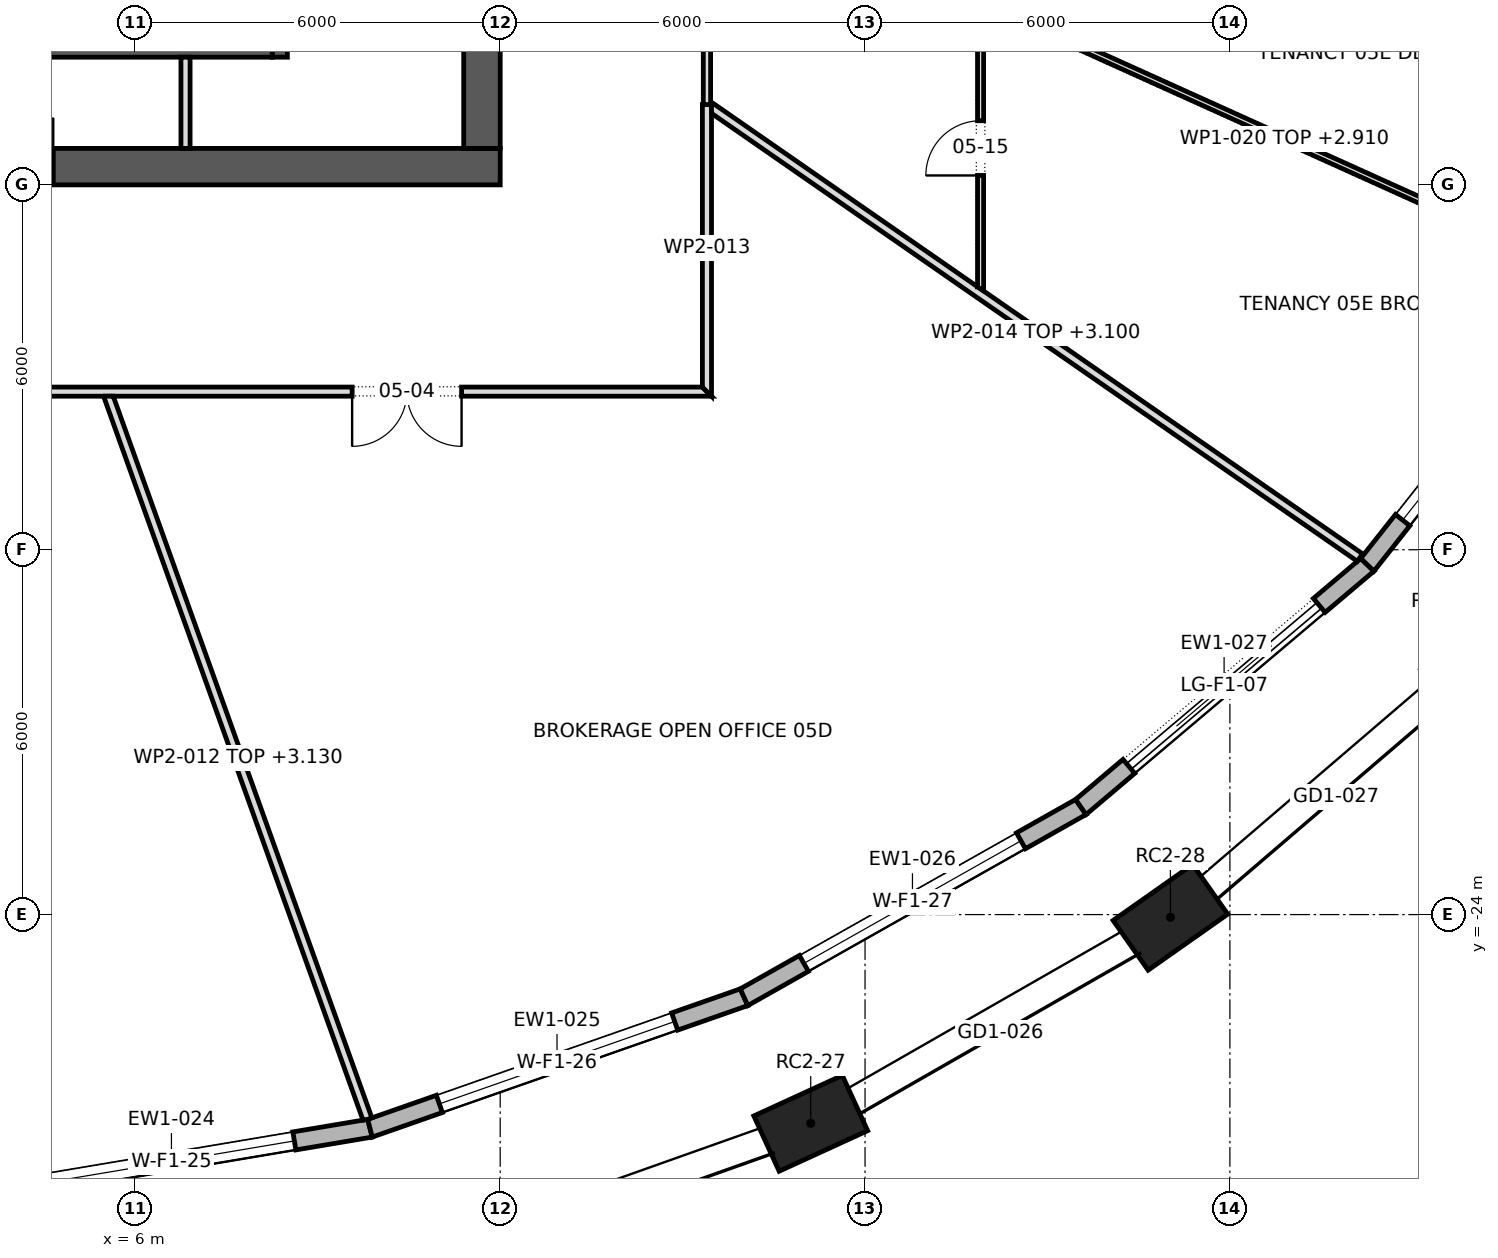
"""IFC4 building model, lengths in metres.
Left out: names, types, materials, properties, quantities, classifications, styles, units other than length and angle.
Written with IfcOpenShell. Run it as: python <this file> out.ifc"""

import sys

from ifc_helpers import new_model, si_unit, direction, frame, frame_2d, origin, origin_2d, place, context, subcontext, project, spatial, polyline, rectangle, outline, extrude, element, fill, save


model = new_model("IFC4")
c1 = context("Model", 3, precision=1e-05, world=origin(), true_north=direction((0.0, 1.0)))
c2 = subcontext(c1, "Body", "Model", "MODEL_VIEW")
j1 = project(units=[si_unit("LENGTHUNIT", "METRE"), si_unit("PLANEANGLEUNIT", "RADIAN")], contexts=[c1])
p1 = place(None, origin())
s1 = spatial("IfcSite", under=j1, at=p1, CompositionType="ELEMENT")
p2 = place(p1, origin())
s2 = spatial("IfcBuilding", under=s1, at=p2, CompositionType="ELEMENT")
p3 = place(p2, frame((0.0, 0.0, 82.3)))
s3 = spatial("IfcBuildingStorey", under=s2, at=p3, CompositionType="ELEMENT", Elevation=82.3)
for number, where, z_axis, x_axis in (
    (1, (17.107, -27.432, 0.0), (0.0, 0.0, 1.0), (0.909, 0.417, 0.0)),
    (2, (23.022, -24.045, 0.0), (0.0, 0.0, 1.0), (0.818, 0.575, 0.0)),
):
    element("IfcColumn", number, at=place(p3, frame(where, z_axis=z_axis, x_axis=x_axis)), inside=s3, PredefinedType="COLUMN", context=c2, shape_type="SweptSolid", body=[
        extrude(rectangle(XDim=1.6, YDim=1.0, at=origin_2d()), origin(), (0.0, 0.0, 1.0), 4.2),
    ])
p4 = place(p3, frame((-12.0, -11.7, 0.0), z_axis=(0.0, 0.0, 1.0), x_axis=(1.0, 0.0, 0.0)))
e3 = element("IfcWall", 3, at=p4, inside=s3, PredefinedType="SHEAR", context=c2, shape_type="SweptSolid", body=[
    extrude(rectangle(XDim=24.0, YDim=0.6, at=frame_2d((12.0, 0.0))), origin(), (0.0, 0.0, 1.0), 4.2),
])
p5 = place(p4, frame((9.975, 0.0, 0.0)))
e4 = element("IfcOpeningElement", 4, at=p5, cuts=e3, PredefinedType="OPENING", context=c2, shape_type="SweptSolid", body=[
    extrude(rectangle(XDim=0.9, YDim=2.1, at=frame_2d((0.45, 1.05))), frame((0.0, 0.312, 0.0), z_axis=(0.0, -1.0, 0.0), x_axis=(1.0, 0.0, 0.0)), (0.0, 0.0, 1.0), 0.624),
])
p6 = place(p4, frame((4.6, 0.0, 0.0)))
e5 = element("IfcOpeningElement", 5, at=p6, cuts=e3, PredefinedType="OPENING", context=c2, shape_type="SweptSolid", body=[
    extrude(rectangle(XDim=0.8, YDim=2.1, at=frame_2d((0.4, 1.05))), frame((0.0, 0.312, 0.0), z_axis=(0.0, -1.0, 0.0), x_axis=(1.0, 0.0, 0.0)), (0.0, 0.0, 1.0), 0.624),
])
p7 = place(p4, frame((7.0, 0.0, 0.0)))
e6 = element("IfcOpeningElement", 6, at=p7, cuts=e3, PredefinedType="OPENING", context=c2, shape_type="SweptSolid", body=[
    extrude(rectangle(XDim=0.8, YDim=2.1, at=frame_2d((0.4, 1.05))), frame((0.0, 0.312, 0.0), z_axis=(0.0, -1.0, 0.0), x_axis=(1.0, 0.0, 0.0)), (0.0, 0.0, 1.0), 0.624),
])
p8 = place(p4, frame((15.85, 0.0, 0.0)))
e7 = element("IfcOpeningElement", 7, at=p8, cuts=e3, PredefinedType="OPENING", context=c2, shape_type="SweptSolid", body=[
    extrude(rectangle(XDim=0.8, YDim=2.1, at=frame_2d((0.4, 1.05))), frame((0.0, 0.312, 0.0), z_axis=(0.0, -1.0, 0.0), x_axis=(1.0, 0.0, 0.0)), (0.0, 0.0, 1.0), 0.624),
])
p9 = place(p3, frame((11.7, -11.4, 0.0), z_axis=(0.0, 0.0, 1.0), x_axis=(0.0, 1.0, 0.0)))
e8 = element("IfcWall", 8, at=p9, inside=s3, PredefinedType="SHEAR", context=c2, shape_type="SweptSolid", body=[
    extrude(rectangle(XDim=22.8, YDim=0.6, at=frame_2d((11.4, 0.0))), origin(), (0.0, 0.0, 1.0), 4.2),
])
p10 = place(p9, frame((10.2, 0.0, 0.0)))
e9 = element("IfcOpeningElement", 9, at=p10, cuts=e8, PredefinedType="OPENING", context=c2, shape_type="SweptSolid", body=[
    extrude(rectangle(XDim=2.4, YDim=2.1, at=frame_2d((1.2, 1.05))), frame((0.0, 0.312, 0.0), z_axis=(0.0, -1.0, 0.0), x_axis=(1.0, 0.0, 0.0)), (0.0, 0.0, 1.0), 0.624),
])
p11 = place(p9, frame((19.5, 0.0, 0.0)))
e10 = element("IfcOpeningElement", 10, at=p11, cuts=e8, PredefinedType="OPENING", context=c2, shape_type="SweptSolid", body=[
    extrude(rectangle(XDim=1.2, YDim=2.1, at=frame_2d((0.6, 1.05))), frame((0.0, 0.312, 0.0), z_axis=(0.0, -1.0, 0.0), x_axis=(1.0, 0.0, 0.0)), (0.0, 0.0, 1.0), 0.624),
])
p12 = place(p9, frame((2.1, 0.0, 0.0)))
e11 = element("IfcOpeningElement", 11, at=p12, cuts=e8, PredefinedType="OPENING", context=c2, shape_type="SweptSolid", body=[
    extrude(rectangle(XDim=1.2, YDim=2.1, at=frame_2d((0.6, 1.05))), frame((0.0, 0.312, 0.0), z_axis=(0.0, -1.0, 0.0), x_axis=(1.0, 0.0, 0.0)), (0.0, 0.0, 1.0), 0.624),
])
p13 = place(p3, frame((3.329, -28.611, 0.0), z_axis=(0.0, 0.0, 1.0), x_axis=(0.986157735925, 0.165809890767, 0.0)))
e12 = element("IfcWall", 12, at=p13, inside=s3, PredefinedType="STANDARD", context=c2, shape_type="SweptSolid", body=[
    extrude(outline(polyline([(-0.012, -0.15), (6.634, -0.15), (6.609, 0.15), (0.012, 0.15), (-0.012, -0.15)])), origin(), (0.0, 0.0, 1.0), 3.9),
])
p14 = place(p13, frame((1.261, 0.0, 0.6)))
e13 = element("IfcOpeningElement", 13, at=p14, cuts=e12, PredefinedType="OPENING", context=c2, shape_type="SweptSolid", body=[
    extrude(rectangle(XDim=4.1, YDim=2.85, at=frame_2d((2.05, 1.425))), frame((0.0, 0.162, 0.0), z_axis=(0.0, -1.0, 0.0), x_axis=(1.0, 0.0, 0.0)), (0.0, 0.0, 1.0), 0.324),
])
p15 = place(p3, frame((9.858, -27.513, 0.0), z_axis=(0.0, 0.0, 1.0), x_axis=(0.943815136299, 0.330473884736, 0.0)))
e14 = element("IfcWall", 14, at=p15, inside=s3, PredefinedType="STANDARD", context=c2, shape_type="SweptSolid", body=[
    extrude(outline(polyline([(-0.013, -0.15), (6.531, -0.15), (6.505, 0.15), (0.013, 0.15), (-0.013, -0.15)])), origin(), (0.0, 0.0, 1.0), 3.9),
])
p16 = place(p15, frame((1.209, 0.0, 0.6)))
e15 = element("IfcOpeningElement", 15, at=p16, cuts=e14, PredefinedType="OPENING", context=c2, shape_type="SweptSolid", body=[
    extrude(rectangle(XDim=4.1, YDim=2.85, at=frame_2d((2.05, 1.425))), frame((0.0, 0.162, 0.0), z_axis=(0.0, -1.0, 0.0), x_axis=(1.0, 0.0, 0.0)), (0.0, 0.0, 1.0), 0.324),
])
p17 = place(p3, frame((16.01, -25.359, 0.0), z_axis=(0.0, 0.0, 1.0), x_axis=(0.870710061474, 0.491796694629, 0.0)))
e16 = element("IfcWall", 16, at=p17, inside=s3, PredefinedType="STANDARD", context=c2, shape_type="SweptSolid", body=[
    extrude(outline(polyline([(-0.013, -0.15), (6.375, -0.15), (6.346, 0.15), (0.013, 0.15), (-0.013, -0.15)])), origin(), (0.0, 0.0, 1.0), 3.9),
])
p18 = place(p17, frame((1.13, 0.0, 0.6)))
e17 = element("IfcOpeningElement", 17, at=p18, cuts=e16, PredefinedType="OPENING", context=c2, shape_type="SweptSolid", body=[
    extrude(rectangle(XDim=4.1, YDim=2.85, at=frame_2d((2.05, 1.425))), frame((0.0, 0.162, 0.0), z_axis=(0.0, -1.0, 0.0), x_axis=(1.0, 0.0, 0.0)), (0.0, 0.0, 1.0), 0.324),
])
p19 = place(p3, frame((21.549, -22.231, 0.0), z_axis=(0.0, 0.0, 1.0), x_axis=(0.763693886759, 0.645578536916, 0.0)))
e18 = element("IfcWall", 18, at=p19, inside=s3, PredefinedType="STANDARD", context=c2, shape_type="SweptSolid", body=[
    extrude(outline(polyline([(-0.014, -0.15), (6.185, -0.15), (6.155, 0.15), (0.014, 0.15), (-0.014, -0.15)])), origin(), (0.0, 0.0, 1.0), 3.9),
])
p20 = place(p19, frame((1.035, 0.0, 0.0)))
e19 = element("IfcOpeningElement", 19, at=p20, cuts=e18, PredefinedType="OPENING", context=c2, shape_type="SweptSolid", body=[
    extrude(rectangle(XDim=4.1, YDim=3.45, at=frame_2d((2.05, 1.725))), frame((0.0, 0.162, 0.0), z_axis=(0.0, -1.0, 0.0), x_axis=(1.0, 0.0, 0.0)), (0.0, 0.0, 1.0), 0.324),
])
p21 = place(p3, frame((26.26, -18.248, 0.0), z_axis=(0.0, 0.0, 1.0), x_axis=(0.620093447965, 0.784527957303, 0.0)))
e20 = element("IfcWall", 20, at=p21, inside=s3, PredefinedType="STANDARD", context=c2, shape_type="SweptSolid", body=[
    extrude(outline(polyline([(-0.015, -0.15), (5.989, -0.15), (5.957, 0.15), (0.015, 0.15), (-0.015, -0.15)])), origin(), (0.0, 0.0, 1.0), 3.9),
])
p22 = place(p21, frame((0.937, 0.0, 0.6)))
e21 = element("IfcOpeningElement", 21, at=p22, cuts=e20, PredefinedType="OPENING", context=c2, shape_type="SweptSolid", body=[
    extrude(rectangle(XDim=4.1, YDim=2.85, at=frame_2d((2.05, 1.425))), frame((0.0, 0.162, 0.0), z_axis=(0.0, -1.0, 0.0), x_axis=(1.0, 0.0, 0.0)), (0.0, 0.0, 1.0), 0.324),
])
p23 = place(p3, frame((8.375, -9.9, 0.0), z_axis=(0.0, 0.0, 1.0), x_axis=(0.0, 1.0, 0.0)))
e22 = element("IfcWall", 22, at=p23, inside=s3, PredefinedType="SHEAR", context=c2, shape_type="SweptSolid", body=[
    extrude(rectangle(XDim=3.4, YDim=0.25, at=frame_2d((1.7, 0.0))), origin(), (0.0, 0.0, 1.0), 3.9),
])
p24 = place(p23, frame((1.175, 0.0, 0.0)))
e23 = element("IfcOpeningElement", 23, at=p24, cuts=e22, PredefinedType="OPENING", context=c2, shape_type="SweptSolid", body=[
    extrude(rectangle(XDim=1.2, YDim=2.1, at=frame_2d((0.6, 1.05))), frame((0.0, 0.137, 0.0), z_axis=(0.0, -1.0, 0.0), x_axis=(1.0, 0.0, 0.0)), (0.0, 0.0, 1.0), 0.274),
])
p25 = place(p3, frame((0.25, -9.825, 0.0), z_axis=(0.0, 0.0, 1.0), x_axis=(1.0, 0.0, 0.0)))
e24 = element("IfcWall", 24, at=p25, inside=s3, PredefinedType="SHEAR", context=c2, shape_type="SweptSolid", body=[
    extrude(rectangle(XDim=8.0, YDim=0.15, at=frame_2d((4.0, 0.0))), origin(), (0.0, 0.0, 1.0), 3.9),
])
p26 = place(p3, frame((6.825, -11.4, 0.0), z_axis=(0.0, 0.0, 1.0), x_axis=(0.0, 1.0, 0.0)))
e25 = element("IfcWall", 25, at=p26, inside=s3, PredefinedType="PARTITIONING", context=c2, shape_type="SweptSolid", body=[
    extrude(rectangle(XDim=1.5, YDim=0.15, at=frame_2d((0.75, 0.0))), origin(), (0.0, 0.0, 1.0), 3.9),
])
p27 = place(p3, frame((-15.475, -15.4, 0.0), z_axis=(0.0, 0.0, 1.0), x_axis=(1.0, 0.0, 0.0)))
e26 = element("IfcWall", 26, at=p27, inside=s3, PredefinedType="PARTITIONING", context=c2, shape_type="SweptSolid", body=[
    extrude(outline(polyline([(0.0, -0.075), (1.935, -0.075), (3.869, -0.075), (5.803, -0.075), (7.738, -0.075), (9.672, -0.075), (11.606, -0.075), (13.541, -0.075), (15.475, -0.075), (17.409, -0.075), (19.344, -0.075), (21.278, -0.075), (23.212, -0.075), (25.147, -0.075), (27.081, -0.075), (29.016, -0.075), (30.95, -0.075), (30.8, 0.075), (28.885, 0.075), (26.969, 0.075), (25.053, 0.075), (23.138, 0.075), (21.222, 0.075), (19.306, 0.075), (17.391, 0.075), (15.475, 0.075), (13.56, 0.075), (11.644, 0.075), (9.728, 0.075), (7.812, 0.075), (5.897, 0.075), (3.981, 0.075), (2.066, 0.075), (0.15, 0.075), (0.0, -0.075)])), origin(), (0.0, 0.0, 1.0), 3.9),
])
p28 = place(p27, frame((2.405, 0.0, 0.0)))
e27 = element("IfcOpeningElement", 27, at=p28, cuts=e26, PredefinedType="OPENING", context=c2, shape_type="SweptSolid", body=[
    extrude(rectangle(XDim=1.0, YDim=2.1, at=frame_2d((0.5, 1.05))), frame((0.0, 0.087, 0.0), z_axis=(0.0, -1.0, 0.0), x_axis=(1.0, 0.0, 0.0)), (0.0, 0.0, 1.0), 0.174),
])
p29 = place(p27, frame((12.47, 0.0, 0.0)))
e28 = element("IfcOpeningElement", 28, at=p29, cuts=e26, PredefinedType="OPENING", context=c2, shape_type="SweptSolid", body=[
    extrude(rectangle(XDim=1.8, YDim=2.1, at=frame_2d((0.9, 1.05))), frame((0.0, 0.087, 0.0), z_axis=(0.0, -1.0, 0.0), x_axis=(1.0, 0.0, 0.0)), (0.0, 0.0, 1.0), 0.174),
])
p30 = place(p27, frame((25.04, 0.0, 0.0)))
e29 = element("IfcOpeningElement", 29, at=p30, cuts=e26, PredefinedType="OPENING", context=c2, shape_type="SweptSolid", body=[
    extrude(rectangle(XDim=1.8, YDim=2.1, at=frame_2d((0.9, 1.05))), frame((0.0, 0.087, 0.0), z_axis=(0.0, -1.0, 0.0), x_axis=(1.0, 0.0, 0.0)), (0.0, 0.0, 1.0), 0.174),
])
p31 = place(p3, frame((5.548, -15.45, 0.0), z_axis=(0.0, 0.0, 1.0), x_axis=(0.337357475529, -0.941376616294, 0.0)))
e30 = element("IfcWall", 30, at=p31, inside=s3, PredefinedType="PARTITIONING", context=c2, shape_type="SweptSolid", body=[
    extrude(outline(polyline([(0.0, -0.075), (1.807, -0.075), (3.613, -0.075), (5.42, -0.075), (7.226, -0.075), (9.033, -0.075), (10.84, -0.075), (12.646, -0.075), (12.66, 0.002), (12.66, 0.018), (12.66, 0.075), (10.859, 0.075), (9.058, 0.075), (7.257, 0.075), (5.456, 0.075), (3.655, 0.075), (1.854, 0.075), (0.053, 0.075), (0.0, -0.074), (0.0, -0.075)])), origin(), (0.0, 0.0, 1.0), 3.13),
])
p32 = place(p3, frame((15.4, -10.68, 0.0), z_axis=(0.0, 0.0, 1.0), x_axis=(0.0, -1.0, 0.0)))
e31 = element("IfcWall", 31, at=p32, inside=s3, PredefinedType="PARTITIONING", context=c2, shape_type="SweptSolid", body=[
    extrude(outline(polyline([(0.0, -0.075), (1.548, -0.075), (3.097, -0.075), (4.645, -0.075), (4.795, 0.075), (3.197, 0.075), (1.598, 0.075), (0.0, 0.075), (0.0, -0.075)])), origin(), (0.0, 0.0, 1.0), 3.9),
])
p33 = place(p3, frame((15.418, -10.692, 0.0), z_axis=(0.0, 0.0, 1.0), x_axis=(0.821683258501, -0.569944403166, 0.0)))
e32 = element("IfcWall", 32, at=p33, inside=s3, PredefinedType="PARTITIONING", context=c2, shape_type="SweptSolid", body=[
    extrude(outline(polyline([(13.047, 0.075), (11.122, 0.075), (9.196, 0.075), (7.271, 0.075), (5.346, 0.075), (5.343, 0.073), (5.342, 0.075), (3.562, 0.075), (1.781, 0.075), (0.0, 0.075), (0.0, 0.074), (0.028, 0.034), (0.04, 0.043), (0.122, -0.075), (1.968, -0.075), (3.815, -0.075), (5.661, -0.075), (7.508, -0.075), (9.354, -0.075), (11.2, -0.075), (13.047, -0.075), (13.047, 0.075)])), origin(), (0.0, 0.0, 1.0), 3.1),
])
p34 = place(p3, frame((15.4, -3.89, 0.0), z_axis=(0.0, 0.0, 1.0), x_axis=(0.0, -1.0, 0.0)))
e33 = element("IfcWall", 33, at=p34, inside=s3, PredefinedType="PARTITIONING", context=c2, shape_type="SweptSolid", body=[
    extrude(rectangle(XDim=6.79, YDim=0.12, at=frame_2d((3.395, 0.0))), origin(), (0.0, 0.0, 1.0), 3.9),
])
p35 = place(p34, frame((2.895, 0.0, 0.0)))
e34 = element("IfcOpeningElement", 34, at=p35, cuts=e33, PredefinedType="OPENING", context=c2, shape_type="SweptSolid", body=[
    extrude(rectangle(XDim=1.0, YDim=2.1, at=frame_2d((0.5, 1.05))), frame((0.0, 0.072, 0.0), z_axis=(0.0, -1.0, 0.0), x_axis=(1.0, 0.0, 0.0)), (0.0, 0.0, 1.0), 0.144),
])
p36 = place(p3, frame((19.9, -13.744, 0.0), z_axis=(0.0, 0.0, 1.0), x_axis=(0.0, 1.0, 0.0)))
e35 = element("IfcWall", 35, at=p36, inside=s3, PredefinedType="PARTITIONING", context=c2, shape_type="SweptSolid", body=[
    extrude(outline(polyline([(0.0, -0.05), (1.559, -0.05), (3.118, -0.05), (4.677, -0.05), (4.678, -0.048), (4.683, -0.05), (6.631, -0.05), (8.58, -0.05), (8.58, -0.048), (8.588, -0.05), (10.286, -0.05), (11.985, -0.05), (13.683, -0.05), (15.382, -0.05), (17.081, -0.05), (18.779, -0.05), (18.779, -0.048), (18.754, 0.05), (16.984, 0.05), (15.214, 0.05), (13.444, 0.05), (11.674, 0.05), (9.904, 0.05), (9.904, 0.05), (9.804, 0.05), (9.804, 0.05), (7.857, 0.05), (5.91, 0.05), (3.963, 0.05), (2.016, 0.05), (0.069, 0.05), (0.0, -0.05), (0.0, -0.05)])), origin(), (0.0, 0.0, 1.0), 3.9),
])
p37 = place(p36, frame((12.179, 0.0, 0.0)))
e36 = element("IfcOpeningElement", 36, at=p37, cuts=e35, PredefinedType="OPENING", context=c2, shape_type="SweptSolid", body=[
    extrude(rectangle(XDim=0.9, YDim=2.1, at=frame_2d((0.45, 1.05))), frame((0.0, 0.062, 0.0), z_axis=(0.0, -1.0, 0.0), x_axis=(1.0, 0.0, 0.0)), (0.0, 0.0, 1.0), 0.124),
])
p38 = place(p36, frame((1.899, 0.0, 0.0)))
e37 = element("IfcOpeningElement", 37, at=p38, cuts=e35, PredefinedType="OPENING", context=c2, shape_type="SweptSolid", body=[
    extrude(rectangle(XDim=0.9, YDim=2.1, at=frame_2d((0.45, 1.05))), frame((0.0, 0.062, 0.0), z_axis=(0.0, -1.0, 0.0), x_axis=(1.0, 0.0, 0.0)), (0.0, 0.0, 1.0), 0.124),
])
p39 = place(p3, frame((19.93, -9.003, 0.0), z_axis=(0.0, 0.0, 1.0), x_axis=(0.911407001064, -0.41150610981, 0.0)))
e38 = element("IfcWall", 38, at=p39, inside=s3, PredefinedType="PARTITIONING", context=c2, shape_type="SweptSolid", body=[
    extrude(outline(polyline([(0.045, -0.05), (1.847, -0.05), (3.65, -0.05), (5.453, -0.05), (7.255, -0.05), (9.058, -0.05), (10.861, -0.05), (10.872, -0.004), (10.874, 0.05), (9.062, 0.05), (7.249, 0.05), (5.437, 0.05), (3.625, 0.05), (1.812, 0.05), (0.0, 0.05), (0.0, 0.049), (0.045, -0.05)])), origin(), (0.0, 0.0, 1.0), 2.91),
])
p40 = place(p14, origin())
e39 = element("IfcWindow", 39, at=p40, inside=s3, PartitioningType="TRIPLE_PANEL_VERTICAL", PredefinedType="WINDOW", context=c2, shape_type="SweptSolid", body=[
    extrude(rectangle(XDim=4.1, YDim=2.85, at=frame_2d((2.05, 1.425))), frame((0.0, 0.03, 0.0), z_axis=(0.0, -1.0, 0.0), x_axis=(1.0, 0.0, 0.0)), (0.0, 0.0, 1.0), 0.06),
])
fill(e13, e39)
p41 = place(p16, origin())
e40 = element("IfcWindow", 40, at=p41, inside=s3, PartitioningType="TRIPLE_PANEL_VERTICAL", PredefinedType="WINDOW", context=c2, shape_type="SweptSolid", body=[
    extrude(rectangle(XDim=4.1, YDim=2.85, at=frame_2d((2.05, 1.425))), frame((0.0, 0.03, 0.0), z_axis=(0.0, -1.0, 0.0), x_axis=(1.0, 0.0, 0.0)), (0.0, 0.0, 1.0), 0.06),
])
fill(e15, e40)
p42 = place(p18, origin())
e41 = element("IfcWindow", 41, at=p42, inside=s3, PartitioningType="TRIPLE_PANEL_VERTICAL", PredefinedType="WINDOW", context=c2, shape_type="SweptSolid", body=[
    extrude(rectangle(XDim=4.1, YDim=2.85, at=frame_2d((2.05, 1.425))), frame((0.0, 0.03, 0.0), z_axis=(0.0, -1.0, 0.0), x_axis=(1.0, 0.0, 0.0)), (0.0, 0.0, 1.0), 0.06),
])
fill(e17, e41)
p43 = place(p20, origin())
e42 = element("IfcDoor", 42, at=p43, inside=s3, OperationType="DOUBLE_DOOR_SLIDING", PredefinedType="DOOR", context=c2, shape_type="SweptSolid", body=[
    extrude(rectangle(XDim=4.1, YDim=3.45, at=frame_2d((2.05, 1.725))), frame((0.0, 0.025, 0.0), z_axis=(0.0, -1.0, 0.0), x_axis=(1.0, 0.0, 0.0)), (0.0, 0.0, 1.0), 0.05),
])
fill(e19, e42)
p44 = place(p22, origin())
e43 = element("IfcWindow", 43, at=p44, inside=s3, PartitioningType="TRIPLE_PANEL_VERTICAL", PredefinedType="WINDOW", context=c2, shape_type="SweptSolid", body=[
    extrude(rectangle(XDim=4.1, YDim=2.85, at=frame_2d((2.05, 1.425))), frame((0.0, 0.03, 0.0), z_axis=(0.0, -1.0, 0.0), x_axis=(1.0, 0.0, 0.0)), (0.0, 0.0, 1.0), 0.06),
])
fill(e21, e43)
p45 = place(p8, origin())
e44 = element("IfcDoor", 44, at=p45, inside=s3, OperationType="SINGLE_SWING_LEFT", PredefinedType="DOOR", context=c2, shape_type="SweptSolid", body=[
    extrude(rectangle(XDim=0.8, YDim=2.1, at=frame_2d((0.4, 1.05))), frame((0.0, 0.025, 0.0), z_axis=(0.0, -1.0, 0.0), x_axis=(1.0, 0.0, 0.0)), (0.0, 0.0, 1.0), 0.05),
])
fill(e7, e44)
p46 = place(p30, frame((1.8, 0.0, 0.0), z_axis=(0.0, 0.0, 1.0), x_axis=(-1.0, 0.0, 0.0)))
e45 = element("IfcDoor", 45, at=p46, inside=s3, OperationType="DOUBLE_DOOR_SINGLE_SWING", PredefinedType="DOOR", context=c2, shape_type="SweptSolid", body=[
    extrude(rectangle(XDim=1.8, YDim=2.1, at=frame_2d((0.9, 1.05))), frame((0.0, 0.025, 0.0), z_axis=(0.0, -1.0, 0.0), x_axis=(1.0, 0.0, 0.0)), (0.0, 0.0, 1.0), 0.05),
])
fill(e29, e45)
p47 = place(p38, origin())
e46 = element("IfcDoor", 46, at=p47, inside=s3, OperationType="SINGLE_SWING_RIGHT", PredefinedType="DOOR", context=c2, shape_type="SweptSolid", body=[
    extrude(rectangle(XDim=0.9, YDim=2.1, at=frame_2d((0.45, 1.05))), frame((0.0, 0.025, 0.0), z_axis=(0.0, -1.0, 0.0), x_axis=(1.0, 0.0, 0.0)), (0.0, 0.0, 1.0), 0.05),
])
fill(e37, e46)
save(model, sys.argv[1])
